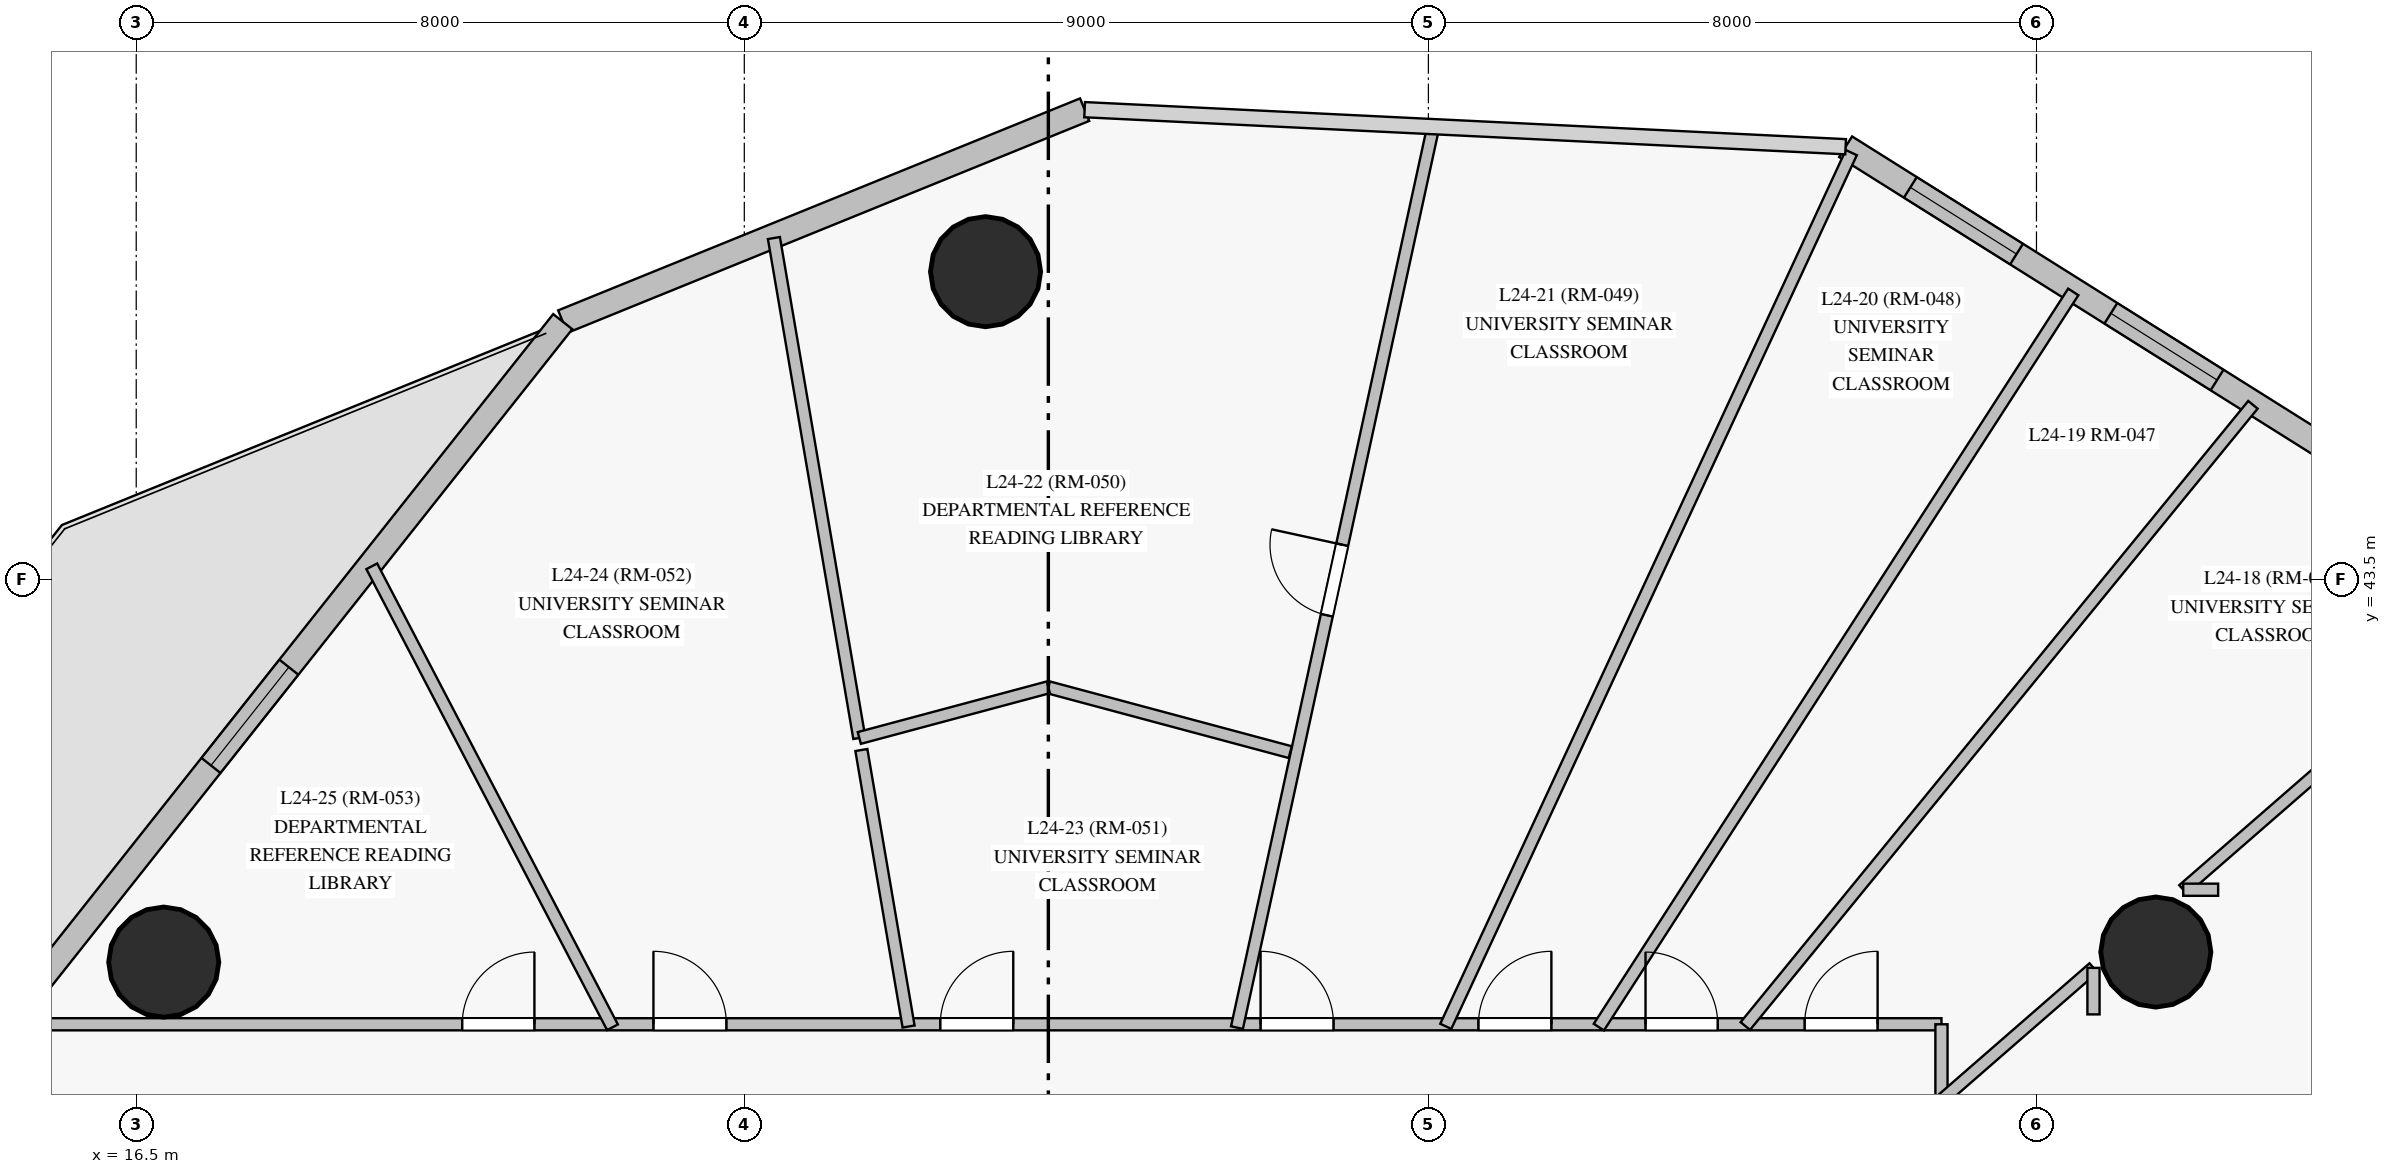
"""IFC4 building model, lengths in metres.
Left out: names, types, materials, properties, quantities, classifications, styles, units other than length and angle.
Written with IfcOpenShell. Run it as: python <this file> out.ifc"""

import sys

from ifc_helpers import new_model, si_unit, direction, frame, frame_2d, origin, origin_with_axes, origin_2d, place, context, subcontext, project, spatial, rectangle, circle, extrude, source, transform, mapped, element, fill, save


model = new_model("IFC4")
c1 = context("Model", 3, precision=1e-05, world=origin(), true_north=direction((0.0, 1.0)))
c2 = subcontext(c1, "Body", "Model", "MODEL_VIEW")
j1 = project(units=[si_unit("LENGTHUNIT", "METRE"), si_unit("PLANEANGLEUNIT", "RADIAN")], contexts=[c1])
p1 = place(None, origin())
s1 = spatial("IfcSite", under=j1, at=p1, CompositionType="ELEMENT")
p2 = place(p1, origin())
s2 = spatial("IfcBuilding", under=s1, at=p2, CompositionType="ELEMENT")
p3 = place(p2, frame((0.0, 0.0, 92.2)))
s3 = spatial("IfcBuildingStorey", under=s2, at=p3, CompositionType="ELEMENT", Elevation=92.2)
m1 = source(origin_with_axes(), c2, "Body", "SweptSolid", [
    extrude(circle(Radius=0.725, at=origin_2d()), origin(), (0.0, 0.0, 1.0), 4.0),
])
for number, where, z_axis, x_axis in (
    (1, (43.07, 38.6, 0.0), (0.0, 0.0, 1.0), (1.0, 0.0, 0.0)),
    (2, (27.674, 47.551, 0.0), (0.0, 0.0, 1.0), (1.0, 0.0, 0.0)),
    (3, (16.862, 38.468, 0.0), (0.0, 0.0, 1.0), (1.0, 0.0, 0.0)),
):
    element("IfcColumn", number, at=place(p3, frame(where, z_axis=z_axis, x_axis=x_axis)), inside=s3, PredefinedType="COLUMN", context=c2, shape_type="MappedRepresentation", body=[
        mapped(m1, transform((0.0, 0.0, 0.0), scale=1.0)),
    ])
p4 = place(p3, frame((49.552, 42.561, 0.0), z_axis=(0.0, 0.0, 1.0), x_axis=(-0.846842838453, 0.531843216523, 0.0)))
e4 = element("IfcWall", 4, at=p4, inside=s3, PredefinedType="SOLIDWALL", context=c2, shape_type="SweptSolid", body=[
    extrude(rectangle(XDim=12.474, YDim=0.32, at=frame_2d((6.237, 0.0))), origin(), (0.0, 0.0, 1.0), 3.775),
])
p5 = place(p4, frame((3.114, 0.0, 0.85)))
e5 = element("IfcOpeningElement", 5, at=p5, cuts=e4, PredefinedType="OPENING", context=c2, shape_type="SweptSolid", body=[
    extrude(rectangle(XDim=1.65, YDim=1.65, at=frame_2d((0.825, 0.825))), frame((0.0, 0.17, 0.0), z_axis=(0.0, -1.0, 0.0), x_axis=(1.0, 0.0, 0.0)), (0.0, 0.0, 1.0), 0.34),
])
p6 = place(p4, frame((6.703, 0.0, 0.85)))
e6 = element("IfcOpeningElement", 6, at=p6, cuts=e4, PredefinedType="OPENING", context=c2, shape_type="SweptSolid", body=[
    extrude(rectangle(XDim=1.65, YDim=1.65, at=frame_2d((0.825, 0.825))), frame((0.0, 0.17, 0.0), z_axis=(0.0, -1.0, 0.0), x_axis=(1.0, 0.0, 0.0)), (0.0, 0.0, 1.0), 0.34),
])
p7 = place(p4, frame((9.818, 0.0, 0.85)))
e7 = element("IfcOpeningElement", 7, at=p7, cuts=e4, PredefinedType="OPENING", context=c2, shape_type="SweptSolid", body=[
    extrude(rectangle(XDim=1.65, YDim=1.65, at=frame_2d((0.825, 0.825))), frame((0.0, 0.17, 0.0), z_axis=(0.0, -1.0, 0.0), x_axis=(1.0, 0.0, 0.0)), (0.0, 0.0, 1.0), 0.34),
])
p8 = place(p3, frame((28.978, 49.682, 0.0), z_axis=(0.0, 0.0, 1.0), x_axis=(-0.926505342359, -0.376281610739, 0.0)))
e8 = element("IfcWall", 8, at=p8, inside=s3, PredefinedType="SOLIDWALL", context=c2, shape_type="SweptSolid", body=[
    extrude(rectangle(XDim=7.411, YDim=0.32, at=frame_2d((3.706, 0.0))), origin(), (0.0, 0.0, 1.0), 3.445),
])
p9 = place(p3, frame((22.111, 46.894, 0.0), z_axis=(0.0, 0.0, 1.0), x_axis=(-0.621146049856, -0.783694828839, 0.0)))
e9 = element("IfcWall", 9, at=p9, inside=s3, PredefinedType="SOLIDWALL", context=c2, shape_type="SweptSolid", body=[
    extrude(rectangle(XDim=24.028, YDim=0.32, at=frame_2d((12.014, 0.0))), origin(), (0.0, 0.0, 1.0), 3.445),
])
p10 = place(p9, frame((5.801, 0.0, 0.85)))
e10 = element("IfcOpeningElement", 10, at=p10, cuts=e9, PredefinedType="OPENING", context=c2, shape_type="SweptSolid", body=[
    extrude(rectangle(XDim=1.65, YDim=1.65, at=frame_2d((0.825, 0.825))), frame((0.0, 0.17, 0.0), z_axis=(0.0, -1.0, 0.0), x_axis=(1.0, 0.0, 0.0)), (0.0, 0.0, 1.0), 0.34),
])
p11 = place(p9, frame((15.706, 0.0, 0.85)))
e11 = element("IfcOpeningElement", 11, at=p11, cuts=e9, PredefinedType="OPENING", context=c2, shape_type="SweptSolid", body=[
    extrude(rectangle(XDim=1.65, YDim=1.65, at=frame_2d((0.825, 0.825))), frame((0.0, 0.17, 0.0), z_axis=(0.0, -1.0, 0.0), x_axis=(1.0, 0.0, 0.0)), (0.0, 0.0, 1.0), 0.34),
])
p12 = place(p9, frame((20.5, 0.0, 0.0)))
e12 = element("IfcOpeningElement", 12, at=p12, cuts=e9, PredefinedType="OPENING", context=c2, shape_type="SweptSolid", body=[
    extrude(rectangle(XDim=1.05, YDim=2.12, at=frame_2d((0.525, 1.06))), frame((0.0, 0.17, 0.0), z_axis=(0.0, -1.0, 0.0), x_axis=(1.0, 0.0, 0.0)), (0.0, 0.0, 1.0), 0.34),
])
p13 = place(p3, frame((14.974, 37.65, 0.0), z_axis=(0.0, 0.0, 1.0), x_axis=(1.0, 0.0, 0.0)))
e13 = element("IfcWall", 13, at=p13, inside=s3, PredefinedType="PARTITIONING", context=c2, shape_type="SweptSolid", body=[
    extrude(rectangle(XDim=25.276, YDim=0.16, at=frame_2d((12.638, 0.0))), origin(), (0.0, 0.0, 1.0), 3.275),
])
p14 = place(p13, frame((23.476, 0.0, 0.0)))
e14 = element("IfcOpeningElement", 14, at=p14, cuts=e13, PredefinedType="OPENING", context=c2, shape_type="SweptSolid", body=[
    extrude(rectangle(XDim=0.96, YDim=2.15, at=frame_2d((0.48, 1.075))), frame((0.0, 0.09, 0.0), z_axis=(0.0, -1.0, 0.0), x_axis=(1.0, 0.0, 0.0)), (0.0, 0.0, 1.0), 0.18),
])
p15 = place(p13, frame((21.383, 0.0, 0.0)))
e15 = element("IfcOpeningElement", 15, at=p15, cuts=e13, PredefinedType="OPENING", context=c2, shape_type="SweptSolid", body=[
    extrude(rectangle(XDim=0.95, YDim=2.15, at=frame_2d((0.475, 1.075))), frame((0.0, 0.09, 0.0), z_axis=(0.0, -1.0, 0.0), x_axis=(1.0, 0.0, 0.0)), (0.0, 0.0, 1.0), 0.18),
])
p16 = place(p13, frame((19.184, 0.0, 0.0)))
e16 = element("IfcOpeningElement", 16, at=p16, cuts=e13, PredefinedType="OPENING", context=c2, shape_type="SweptSolid", body=[
    extrude(rectangle(XDim=0.96, YDim=2.15, at=frame_2d((0.48, 1.075))), frame((0.0, 0.09, 0.0), z_axis=(0.0, -1.0, 0.0), x_axis=(1.0, 0.0, 0.0)), (0.0, 0.0, 1.0), 0.18),
])
p17 = place(p13, frame((16.318, 0.0, 0.0)))
e17 = element("IfcOpeningElement", 17, at=p17, cuts=e13, PredefinedType="OPENING", context=c2, shape_type="SweptSolid", body=[
    extrude(rectangle(XDim=0.96, YDim=2.15, at=frame_2d((0.48, 1.075))), frame((0.0, 0.09, 0.0), z_axis=(0.0, -1.0, 0.0), x_axis=(1.0, 0.0, 0.0)), (0.0, 0.0, 1.0), 0.18),
])
p18 = place(p13, frame((12.104, 0.0, 0.0)))
e18 = element("IfcOpeningElement", 18, at=p18, cuts=e13, PredefinedType="OPENING", context=c2, shape_type="SweptSolid", body=[
    extrude(rectangle(XDim=0.96, YDim=2.15, at=frame_2d((0.48, 1.075))), frame((0.0, 0.09, 0.0), z_axis=(0.0, -1.0, 0.0), x_axis=(1.0, 0.0, 0.0)), (0.0, 0.0, 1.0), 0.18),
])
p19 = place(p13, frame((8.331, 0.0, 0.0)))
e19 = element("IfcOpeningElement", 19, at=p19, cuts=e13, PredefinedType="OPENING", context=c2, shape_type="SweptSolid", body=[
    extrude(rectangle(XDim=0.96, YDim=2.15, at=frame_2d((0.48, 1.075))), frame((0.0, 0.09, 0.0), z_axis=(0.0, -1.0, 0.0), x_axis=(1.0, 0.0, 0.0)), (0.0, 0.0, 1.0), 0.18),
])
p20 = place(p13, frame((5.815, 0.0, 0.0)))
e20 = element("IfcOpeningElement", 20, at=p20, cuts=e13, PredefinedType="OPENING", context=c2, shape_type="SweptSolid", body=[
    extrude(rectangle(XDim=0.95, YDim=2.15, at=frame_2d((0.475, 1.075))), frame((0.0, 0.09, 0.0), z_axis=(0.0, -1.0, 0.0), x_axis=(1.0, 0.0, 0.0)), (0.0, 0.0, 1.0), 0.18),
])
p21 = place(p3, frame((40.25, 37.65, 0.0), z_axis=(0.0, 0.0, 1.0), x_axis=(0.0, -1.0, 0.0)))
e21 = element("IfcWall", 21, at=p21, inside=s3, PredefinedType="PARTITIONING", context=c2, shape_type="SweptSolid", body=[
    extrude(rectangle(XDim=22.3, YDim=0.16, at=frame_2d((11.15, 0.0))), origin(), (0.0, 0.0, 1.0), 3.175),
])
p22 = place(p21, frame((16.25, 0.0, 0.0)))
e22 = element("IfcOpeningElement", 22, at=p22, cuts=e21, PredefinedType="OPENING", context=c2, shape_type="SweptSolid", body=[
    extrude(rectangle(XDim=0.96, YDim=2.15, at=frame_2d((0.48, 1.075))), frame((0.0, 0.09, 0.0), z_axis=(0.0, -1.0, 0.0), x_axis=(1.0, 0.0, 0.0)), (0.0, 0.0, 1.0), 0.18),
])
p23 = place(p21, frame((10.675, 0.0, 0.0)))
e23 = element("IfcOpeningElement", 23, at=p23, cuts=e21, PredefinedType="OPENING", context=c2, shape_type="SweptSolid", body=[
    extrude(rectangle(XDim=0.95, YDim=2.15, at=frame_2d((0.475, 1.075))), frame((0.0, 0.09, 0.0), z_axis=(0.0, -1.0, 0.0), x_axis=(1.0, 0.0, 0.0)), (0.0, 0.0, 1.0), 0.18),
])
p24 = place(p21, frame((9.178, 0.0, 0.0)))
e24 = element("IfcOpeningElement", 24, at=p24, cuts=e21, PredefinedType="OPENING", context=c2, shape_type="SweptSolid", body=[
    extrude(rectangle(XDim=0.86, YDim=2.1, at=frame_2d((0.43, 1.05))), frame((0.0, 0.09, 0.0), z_axis=(0.0, -1.0, 0.0), x_axis=(1.0, 0.0, 0.0)), (0.0, 0.0, 1.0), 0.18),
])
p25 = place(p21, frame((6.39, 0.0, 0.0)))
e25 = element("IfcOpeningElement", 25, at=p25, cuts=e21, PredefinedType="OPENING", context=c2, shape_type="SweptSolid", body=[
    extrude(rectangle(XDim=0.96, YDim=2.15, at=frame_2d((0.48, 1.075))), frame((0.0, 0.09, 0.0), z_axis=(0.0, -1.0, 0.0), x_axis=(1.0, 0.0, 0.0)), (0.0, 0.0, 1.0), 0.18),
])
p26 = place(p21, frame((5.24, 0.0, 0.0)))
e26 = element("IfcOpeningElement", 26, at=p26, cuts=e21, PredefinedType="OPENING", context=c2, shape_type="SweptSolid", body=[
    extrude(rectangle(XDim=0.95, YDim=2.15, at=frame_2d((0.475, 1.075))), frame((0.0, 0.09, 0.0), z_axis=(0.0, -1.0, 0.0), x_axis=(1.0, 0.0, 0.0)), (0.0, 0.0, 1.0), 0.18),
])
p27 = place(p21, frame((2.386, 0.0, 0.0)))
e27 = element("IfcOpeningElement", 27, at=p27, cuts=e21, PredefinedType="OPENING", context=c2, shape_type="SweptSolid", body=[
    extrude(rectangle(XDim=0.96, YDim=2.15, at=frame_2d((0.48, 1.075))), frame((0.0, 0.09, 0.0), z_axis=(0.0, -1.0, 0.0), x_axis=(1.0, 0.0, 0.0)), (0.0, 0.0, 1.0), 0.18),
])
p28 = place(p3, frame((33.729, 37.623, 0.0), z_axis=(0.0, 0.0, 1.0), x_axis=(0.421024135542, 0.907049434866, 0.0)))
e28 = element("IfcWall", 28, at=p28, inside=s3, PredefinedType="PARTITIONING", context=c2, shape_type="SweptSolid", body=[
    extrude(rectangle(XDim=12.673, YDim=0.16, at=frame_2d((6.336, 0.0))), origin(), (0.0, 0.0, 1.0), 3.775),
])
p29 = place(p3, frame((30.982, 37.606, 0.0), z_axis=(0.0, 0.0, 1.0), x_axis=(0.212896840781, 0.977074682501, 0.0)))
e29 = element("IfcWall", 29, at=p29, inside=s3, PredefinedType="PARTITIONING", context=c2, shape_type="SweptSolid", body=[
    extrude(rectangle(XDim=12.105, YDim=0.16, at=frame_2d((6.053, 0.0))), origin(), (0.0, 0.0, 1.0), 3.775),
])
p30 = place(p29, frame((5.552, 0.0, 0.0)))
e30 = element("IfcOpeningElement", 30, at=p30, cuts=e29, PredefinedType="OPENING", context=c2, shape_type="SweptSolid", body=[
    extrude(rectangle(XDim=0.95, YDim=2.15, at=frame_2d((0.475, 1.075))), frame((0.0, 0.09, 0.0), z_axis=(0.0, -1.0, 0.0), x_axis=(1.0, 0.0, 0.0)), (0.0, 0.0, 1.0), 0.18),
])
p31 = place(p3, frame((40.21, 32.658, 0.0), z_axis=(0.0, 0.0, 1.0), x_axis=(0.88295316145, 0.469461089639, 0.0)))
e31 = element("IfcWall", 31, at=p31, inside=s3, PredefinedType="PARTITIONING", context=c2, shape_type="SweptSolid", body=[
    extrude(rectangle(XDim=11.943, YDim=0.16, at=frame_2d((5.972, 0.0))), origin(), (0.0, 0.0, 1.0), 3.775),
])
p32 = place(p3, frame((35.742, 37.612, 0.0), z_axis=(0.0, 0.0, 1.0), x_axis=(0.542226381043, 0.840232439091, 0.0)))
e32 = element("IfcWall", 32, at=p32, inside=s3, PredefinedType="PARTITIONING", context=c2, shape_type="SweptSolid", body=[
    extrude(rectangle(XDim=11.511, YDim=0.16, at=frame_2d((5.756, 0.0))), origin(), (0.0, 0.0, 1.0), 3.775),
])
p33 = place(p3, frame((37.67, 37.627, 0.0), z_axis=(0.0, 0.0, 1.0), x_axis=(0.632743862199, 0.774361159182, 0.0)))
e33 = element("IfcWall", 33, at=p33, inside=s3, PredefinedType="PARTITIONING", context=c2, shape_type="SweptSolid", body=[
    extrude(rectangle(XDim=10.554, YDim=0.16, at=frame_2d((5.277, 0.0))), origin(), (0.0, 0.0, 1.0), 3.775),
])
p34 = place(p3, frame((22.766, 37.61, 0.0), z_axis=(0.0, 0.0, 1.0), x_axis=(-0.462887924106, 0.886416814888, 0.0)))
e34 = element("IfcWall", 34, at=p34, inside=s3, PredefinedType="PARTITIONING", context=c2, shape_type="SweptSolid", body=[
    extrude(rectangle(XDim=6.842, YDim=0.16, at=frame_2d((3.421, 0.0))), origin(), (0.0, 0.0, 1.0), 3.775),
])
p35 = place(p3, frame((26.013, 41.417, 0.0), z_axis=(0.0, 0.0, 1.0), x_axis=(-0.168355431292, 0.98572635592, 0.0)))
e35 = element("IfcWall", 35, at=p35, inside=s3, PredefinedType="PARTITIONING", context=c2, shape_type="SweptSolid", body=[
    extrude(rectangle(XDim=6.672, YDim=0.16, at=frame_2d((3.336, 0.0))), origin(), (0.0, 0.0, 1.0), 3.775),
])
p36 = place(p3, frame((43.431, 39.42, 0.0), z_axis=(0.0, 0.0, 1.0), x_axis=(0.754202064337, 0.656642403557, 0.0)))
e36 = element("IfcWall", 36, at=p36, inside=s3, PredefinedType="PARTITIONING", context=c2, shape_type="SweptSolid", body=[
    extrude(rectangle(XDim=6.151, YDim=0.16, at=frame_2d((3.076, 0.0))), origin(), (0.0, 0.0, 1.0), 3.775),
])
p37 = place(p3, frame((26.661, 37.62, 0.0), z_axis=(0.0, 0.0, 1.0), x_axis=(-0.168367016112, 0.98572437724, 0.0)))
e37 = element("IfcWall", 37, at=p37, inside=s3, PredefinedType="PARTITIONING", context=c2, shape_type="SweptSolid", body=[
    extrude(rectangle(XDim=3.69, YDim=0.16, at=frame_2d((1.845, 0.0))), origin(), (0.0, 0.0, 1.0), 2.975),
])
p38 = place(p3, frame((31.682, 41.23, 0.0), z_axis=(0.0, 0.0, 1.0), x_axis=(-0.96592059677, 0.258838561144, 0.0)))
e38 = element("IfcWall", 38, at=p38, inside=s3, PredefinedType="PARTITIONING", context=c2, shape_type="SweptSolid", body=[
    extrude(rectangle(XDim=3.295, YDim=0.16, at=frame_2d((1.647, 0.0))), origin(), (0.0, 0.0, 1.0), 3.275),
])
p39 = place(p3, frame((40.227, 36.631, 0.0), z_axis=(0.0, 0.0, 1.0), x_axis=(0.754215383826, 0.656627104832, 0.0)))
e39 = element("IfcWall", 39, at=p39, inside=s3, PredefinedType="PARTITIONING", context=c2, shape_type="SweptSolid", body=[
    extrude(rectangle(XDim=2.682, YDim=0.16, at=frame_2d((1.341, 0.0))), origin(), (0.0, 0.0, 1.0), 2.975),
])
p40 = place(p3, frame((28.5, 42.083, 0.0), z_axis=(0.0, 0.0, 1.0), x_axis=(-0.96594001059, -0.258766102768, 0.0)))
e40 = element("IfcWall", 40, at=p40, inside=s3, PredefinedType="PARTITIONING", context=c2, shape_type="SweptSolid", body=[
    extrude(rectangle(XDim=2.575, YDim=0.16, at=frame_2d((1.287, 0.0))), origin(), (0.0, 0.0, 1.0), 3.275),
])
p41 = place(p3, frame((42.25, 38.392, 0.0), z_axis=(0.0, 0.0, 1.0), x_axis=(0.0, -1.0, 0.0)))
e41 = element("IfcWall", 41, at=p41, inside=s3, PredefinedType="PARTITIONING", context=c2, shape_type="SweptSolid", body=[
    extrude(rectangle(XDim=0.612, YDim=0.16, at=frame_2d((0.306, 0.0))), origin(), (0.0, 0.0, 1.0), 3.275),
])
p42 = place(p3, frame((43.89, 39.42, 0.0), z_axis=(0.0, 0.0, 1.0), x_axis=(-1.0, 0.0, 0.0)))
e42 = element("IfcWall", 42, at=p42, inside=s3, PredefinedType="PARTITIONING", context=c2, shape_type="SweptSolid", body=[
    extrude(rectangle(XDim=0.459, YDim=0.16, at=frame_2d((0.229, 0.0))), origin(), (0.0, 0.0, 1.0), 3.775),
])
m2 = source(origin_with_axes(), c2, "Body", "SweptSolid", [
    extrude(rectangle(XDim=1.65, YDim=1.65, at=frame_2d((0.825, 0.825))), frame((0.0, 0.03, 0.0), z_axis=(0.0, -1.0, 0.0), x_axis=(1.0, 0.0, 0.0)), (0.0, 0.0, 1.0), 0.06),
])
p43 = place(p6, origin())
e43 = element("IfcWindow", 43, at=p43, inside=s3, PartitioningType="SINGLE_PANEL", PredefinedType="WINDOW", context=c2, shape_type="MappedRepresentation", body=[
    mapped(m2, transform((0.0, 0.0, 0.0), scale=1.0)),
])
fill(e6, e43)
p44 = place(p7, origin())
e44 = element("IfcWindow", 44, at=p44, inside=s3, PartitioningType="SINGLE_PANEL", PredefinedType="WINDOW", context=c2, shape_type="MappedRepresentation", body=[
    mapped(m2, transform((0.0, 0.0, 0.0), scale=1.0)),
])
fill(e7, e44)
p45 = place(p10, origin())
e45 = element("IfcWindow", 45, at=p45, inside=s3, PartitioningType="SINGLE_PANEL", PredefinedType="WINDOW", context=c2, shape_type="MappedRepresentation", body=[
    mapped(m2, transform((0.0, 0.0, 0.0), scale=1.0)),
])
fill(e10, e45)
m3 = source(origin_with_axes(), c2, "Body", "SweptSolid", [
    extrude(rectangle(XDim=0.96, YDim=2.15, at=frame_2d((0.48, 1.075))), frame((0.0, 0.025, 0.0), z_axis=(0.0, -1.0, 0.0), x_axis=(1.0, 0.0, 0.0)), (0.0, 0.0, 1.0), 0.05),
])
p46 = place(p14, origin())
e46 = element("IfcDoor", 46, at=p46, inside=s3, OperationType="SINGLE_SWING_RIGHT", PredefinedType="DOOR", context=c2, shape_type="MappedRepresentation", body=[
    mapped(m3, transform((0.0, 0.0, 0.0), scale=1.0)),
])
fill(e14, e46)
m4 = source(origin_with_axes(), c2, "Body", "SweptSolid", [
    extrude(rectangle(XDim=0.95, YDim=2.15, at=frame_2d((0.475, 1.075))), frame((0.0, 0.025, 0.0), z_axis=(0.0, -1.0, 0.0), x_axis=(1.0, 0.0, 0.0)), (0.0, 0.0, 1.0), 0.05),
])
p47 = place(p15, origin())
e47 = element("IfcDoor", 47, at=p47, inside=s3, OperationType="SINGLE_SWING_LEFT", PredefinedType="DOOR", context=c2, shape_type="MappedRepresentation", body=[
    mapped(m4, transform((0.0, 0.0, 0.0), scale=1.0)),
])
fill(e15, e47)
p48 = place(p16, origin())
e48 = element("IfcDoor", 48, at=p48, inside=s3, OperationType="SINGLE_SWING_RIGHT", PredefinedType="DOOR", context=c2, shape_type="MappedRepresentation", body=[
    mapped(m3, transform((0.0, 0.0, 0.0), scale=1.0)),
])
fill(e16, e48)
p49 = place(p17, origin())
e49 = element("IfcDoor", 49, at=p49, inside=s3, OperationType="SINGLE_SWING_LEFT", PredefinedType="DOOR", context=c2, shape_type="MappedRepresentation", body=[
    mapped(m3, transform((0.0, 0.0, 0.0), scale=1.0)),
])
fill(e17, e49)
p50 = place(p18, origin())
e50 = element("IfcDoor", 50, at=p50, inside=s3, OperationType="SINGLE_SWING_RIGHT", PredefinedType="DOOR", context=c2, shape_type="MappedRepresentation", body=[
    mapped(m3, transform((0.0, 0.0, 0.0), scale=1.0)),
])
fill(e18, e50)
p51 = place(p19, origin())
e51 = element("IfcDoor", 51, at=p51, inside=s3, OperationType="SINGLE_SWING_LEFT", PredefinedType="DOOR", context=c2, shape_type="MappedRepresentation", body=[
    mapped(m3, transform((0.0, 0.0, 0.0), scale=1.0)),
])
fill(e19, e51)
p52 = place(p20, origin())
e52 = element("IfcDoor", 52, at=p52, inside=s3, OperationType="SINGLE_SWING_RIGHT", PredefinedType="DOOR", context=c2, shape_type="MappedRepresentation", body=[
    mapped(m4, transform((0.0, 0.0, 0.0), scale=1.0)),
])
fill(e20, e52)
p53 = place(p30, origin())
e53 = element("IfcDoor", 53, at=p53, inside=s3, OperationType="SINGLE_SWING_RIGHT", PredefinedType="DOOR", context=c2, shape_type="MappedRepresentation", body=[
    mapped(m4, transform((0.0, 0.0, 0.0), scale=1.0)),
])
fill(e30, e53)
save(model, sys.argv[1])
